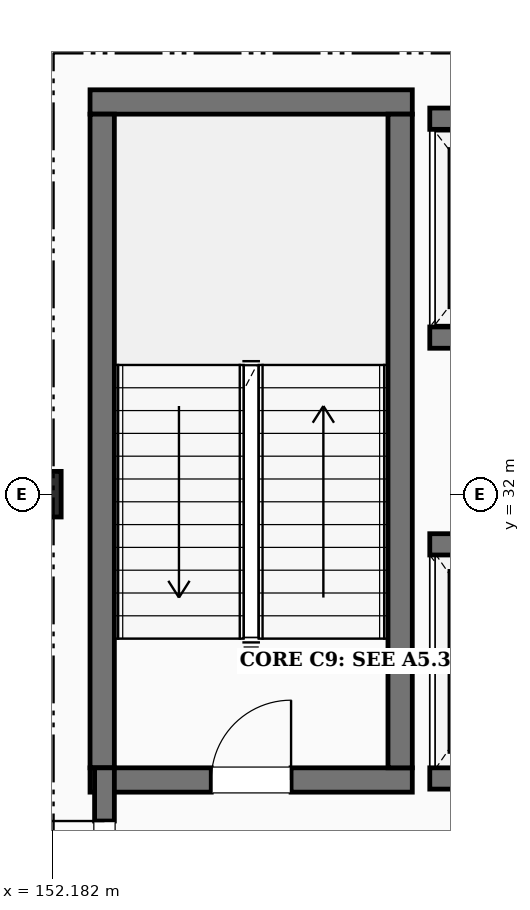
"""IFC4 building model, lengths in metres.
Left out: names, types, materials, properties, quantities, classifications, styles, units other than length and angle.
Written with IfcOpenShell. Run it as: python <this file> out.ifc"""

import sys

from ifc_helpers import new_model, si_unit, direction, frame, frame_2d, origin, origin_2d, place, context, subcontext, project, spatial, rectangle, extrude, element, fill, save


model = new_model("IFC4")
c1 = context("Model", 3, precision=1e-05, world=origin(), true_north=direction((0.0, 1.0)))
c2 = subcontext(c1, "Body", "Model", "MODEL_VIEW")
j1 = project(units=[si_unit("LENGTHUNIT", "METRE"), si_unit("PLANEANGLEUNIT", "RADIAN")], contexts=[c1])
p1 = place(None, origin())
s1 = spatial("IfcSite", under=j1, at=p1, CompositionType="ELEMENT")
p2 = place(p1, origin())
s2 = spatial("IfcBuilding", under=s1, at=p2, CompositionType="ELEMENT")
p3 = place(p2, frame((0.0, 0.0, 19.2)))
s3 = spatial("IfcBuildingStorey", under=s2, at=p3, CompositionType="ELEMENT", Elevation=19.2)
p4 = place(p3, frame((152.0, 32.0, 0.0), z_axis=(0.0, 0.0, 1.0), x_axis=(1.0, 0.0, 0.0)))
e1 = element("IfcColumn", 1, at=p4, inside=s3, PredefinedType="COLUMN", context=c2, shape_type="SweptSolid", body=[
    extrude(rectangle(XDim=0.6, YDim=0.6, at=origin_2d()), origin(), (0.0, 0.0, 1.0), 4.2),
])
p5 = place(p3, frame((152.68, 28.24, 0.0), z_axis=(0.0, 0.0, 1.0), x_axis=(1.0, 0.0, 0.0)))
e2 = element("IfcWall", 2, at=p5, inside=s3, PredefinedType="SHEAR", context=c2, shape_type="SweptSolid", body=[
    extrude(rectangle(XDim=4.24, YDim=0.32, at=frame_2d((2.12, 0.0))), origin(), (0.0, 0.0, 1.0), 4.2),
])
p6 = place(p5, frame((1.595, 0.0, 0.0)))
e3 = element("IfcOpeningElement", 3, at=p6, cuts=e2, PredefinedType="OPENING", context=c2, shape_type="SweptSolid", body=[
    extrude(rectangle(XDim=1.05, YDim=2.15, at=frame_2d((0.525, 1.075))), frame((0.0, 0.17, 0.0), z_axis=(0.0, -1.0, 0.0), x_axis=(1.0, 0.0, 0.0)), (0.0, 0.0, 1.0), 0.34),
])
p7 = place(p3, frame((152.68, 37.16, 0.0), z_axis=(0.0, 0.0, 1.0), x_axis=(1.0, 0.0, 0.0)))
e4 = element("IfcWall", 4, at=p7, inside=s3, PredefinedType="SHEAR", context=c2, shape_type="SweptSolid", body=[
    extrude(rectangle(XDim=4.24, YDim=0.32, at=frame_2d((2.12, 0.0))), origin(), (0.0, 0.0, 1.0), 4.2),
])
for number, where, z_axis, x_axis in (
    (5, (152.84, 28.4, 0.0), (0.0, 0.0, 1.0), (0.0, 1.0, 0.0)),
    (6, (156.76, 28.4, 0.0), (0.0, 0.0, 1.0), (0.0, 1.0, 0.0)),
):
    element("IfcWall", number, at=place(p3, frame(where, z_axis=z_axis, x_axis=x_axis)), inside=s3, PredefinedType="SHEAR", context=c2, shape_type="SweptSolid", body=[
        extrude(rectangle(XDim=8.6, YDim=0.32, at=frame_2d((4.3, 0.0))), origin(), (0.0, 0.0, 1.0), 4.2),
    ])
p8 = place(p3, frame((152.87, 24.54, 0.0), z_axis=(0.0, 0.0, 1.0), x_axis=(0.0, 1.0, 0.0)))
e7 = element("IfcWall", 7, at=p8, inside=s3, PredefinedType="SHEAR", context=c2, shape_type="SweptSolid", body=[
    extrude(rectangle(XDim=3.86, YDim=0.26, at=frame_2d((1.93, 0.0))), origin(), (0.0, 0.0, 1.0), 4.2),
])
p9 = place(p8, frame((1.46, 0.0, 0.0)))
e8 = element("IfcOpeningElement", 8, at=p9, cuts=e7, PredefinedType="OPENING", context=c2, shape_type="SweptSolid", body=[
    extrude(rectangle(XDim=1.7, YDim=2.2, at=frame_2d((0.85, 1.1))), frame((0.0, 0.14, 0.0), z_axis=(0.0, -1.0, 0.0), x_axis=(1.0, 0.0, 0.0)), (0.0, 0.0, 1.0), 0.28),
])
p10 = place(p3, frame((157.15, 28.26, 0.0), z_axis=(0.0, 0.0, 1.0), x_axis=(1.0, 0.0, 0.0)))
e9 = element("IfcWall", 9, at=p10, inside=s3, PredefinedType="SHEAR", context=c2, shape_type="SweptSolid", body=[
    extrude(rectangle(XDim=2.38, YDim=0.28, at=frame_2d((1.19, 0.0))), origin(), (0.0, 0.0, 1.0), 4.2),
])
p11 = place(p10, frame((0.615, 0.0, 0.0)))
e10 = element("IfcOpeningElement", 10, at=p11, cuts=e9, PredefinedType="OPENING", context=c2, shape_type="SweptSolid", body=[
    extrude(rectangle(XDim=1.15, YDim=2.2, at=frame_2d((0.575, 1.1))), frame((0.0, 0.15, 0.0), z_axis=(0.0, -1.0, 0.0), x_axis=(1.0, 0.0, 0.0)), (0.0, 0.0, 1.0), 0.3),
])
for number, where, z_axis, x_axis in (
    (11, (157.15, 31.34, 0.0), (0.0, 0.0, 1.0), (1.0, 0.0, 0.0)),
    (12, (157.15, 34.06, 0.0), (0.0, 0.0, 1.0), (1.0, 0.0, 0.0)),
):
    element("IfcWall", number, at=place(p3, frame(where, z_axis=z_axis, x_axis=x_axis)), inside=s3, PredefinedType="SHEAR", context=c2, shape_type="SweptSolid", body=[
        extrude(rectangle(XDim=2.38, YDim=0.28, at=frame_2d((1.19, 0.0))), origin(), (0.0, 0.0, 1.0), 4.2),
    ])
p12 = place(p3, frame((157.15, 36.94, 0.0), z_axis=(0.0, 0.0, 1.0), x_axis=(1.0, 0.0, 0.0)))
e13 = element("IfcWall", 13, at=p12, inside=s3, PredefinedType="SHEAR", context=c2, shape_type="SweptSolid", body=[
    extrude(rectangle(XDim=2.38, YDim=0.28, at=frame_2d((1.19, 0.0))), origin(), (0.0, 0.0, 1.0), 4.2),
])
p13 = place(p12, frame((0.69, 0.0, 0.0)))
e14 = element("IfcOpeningElement", 14, at=p13, cuts=e13, PredefinedType="OPENING", context=c2, shape_type="SweptSolid", body=[
    extrude(rectangle(XDim=1.0, YDim=2.15, at=frame_2d((0.5, 1.075))), frame((0.0, 0.15, 0.0), z_axis=(0.0, -1.0, 0.0), x_axis=(1.0, 0.0, 0.0)), (0.0, 0.0, 1.0), 0.3),
])
p14 = place(p6, origin())
e15 = element("IfcDoor", 15, at=p14, inside=s3, OperationType="SINGLE_SWING_RIGHT", PredefinedType="DOOR", context=c2, shape_type="SweptSolid", body=[
    extrude(rectangle(XDim=1.05, YDim=2.15, at=frame_2d((0.525, 1.075))), frame((0.0, 0.025, 0.0), z_axis=(0.0, -1.0, 0.0), x_axis=(1.0, 0.0, 0.0)), (0.0, 0.0, 1.0), 0.05),
])
fill(e3, e15)
p15 = place(p9, origin())
e16 = element("IfcDoor", 16, at=p15, inside=s3, OperationType="DOUBLE_DOOR_SINGLE_SWING", PredefinedType="DOOR", context=c2, shape_type="SweptSolid", body=[
    extrude(rectangle(XDim=1.7, YDim=2.2, at=frame_2d((0.85, 1.1))), frame((0.0, 0.025, 0.0), z_axis=(0.0, -1.0, 0.0), x_axis=(1.0, 0.0, 0.0)), (0.0, 0.0, 1.0), 0.05),
])
fill(e8, e16)
save(model, sys.argv[1])
